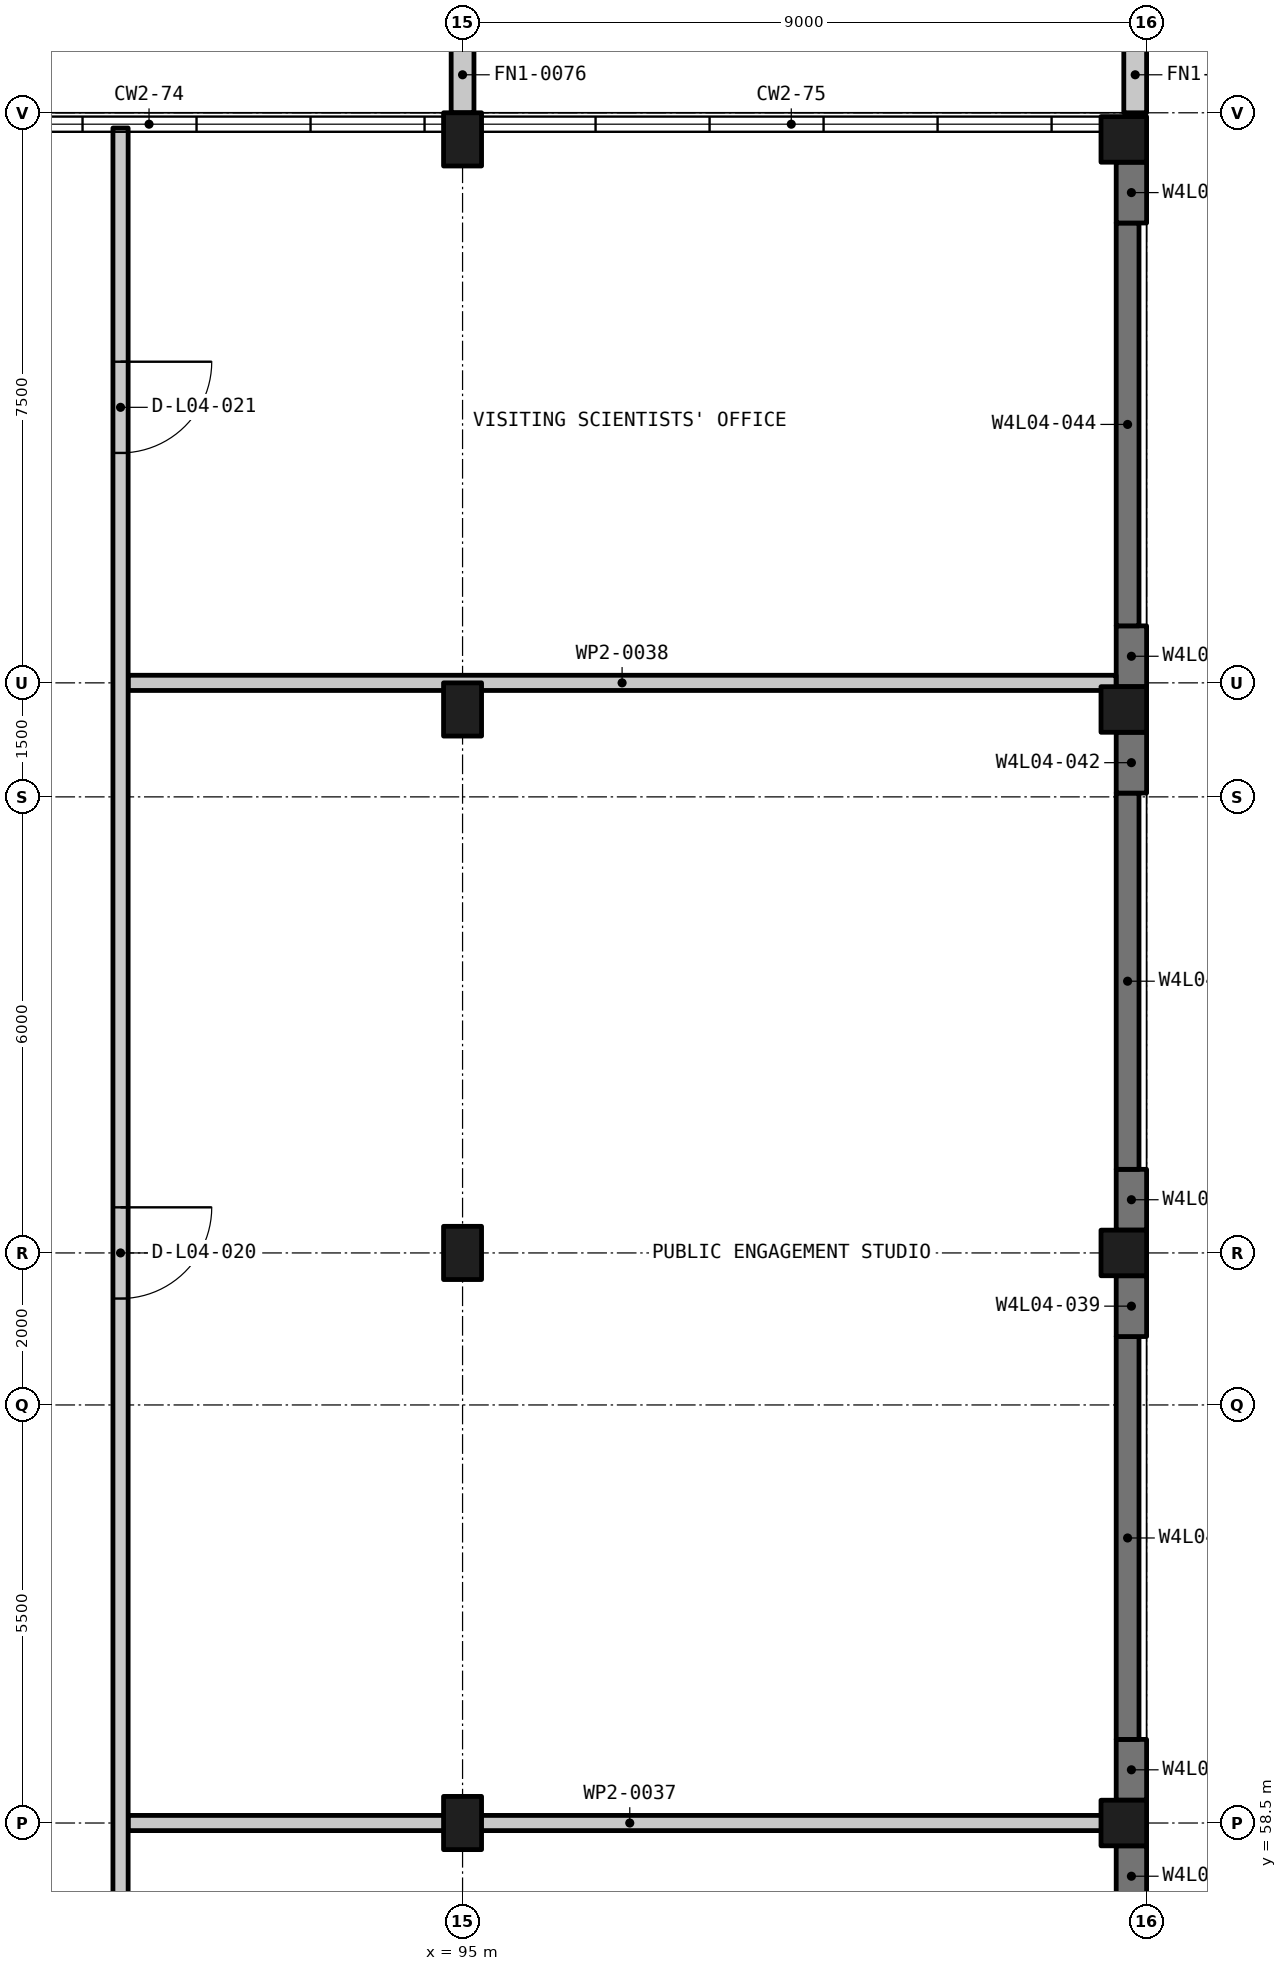
"""IFC4 building model, lengths in metres.
Left out: names, types, materials, properties, quantities, classifications, styles, units other than length and angle.
Written with IfcOpenShell. Run it as: python <this file> out.ifc"""

import sys

from ifc_helpers import new_model, si_unit, direction, frame, frame_2d, origin, origin_2d, place, context, subcontext, project, spatial, rectangle, extrude, element, fill, save


model = new_model("IFC4")
c1 = context("Model", 3, precision=1e-05, world=origin(), true_north=direction((0.0, 1.0)))
c2 = subcontext(c1, "Body", "Model", "MODEL_VIEW")
j1 = project(units=[si_unit("LENGTHUNIT", "METRE"), si_unit("PLANEANGLEUNIT", "RADIAN")], contexts=[c1])
p1 = place(None, origin())
s1 = spatial("IfcSite", under=j1, at=p1, CompositionType="ELEMENT")
p2 = place(p1, origin())
s2 = spatial("IfcBuilding", under=s1, at=p2, CompositionType="ELEMENT")
p3 = place(p2, frame((0.0, 0.0, 20.25)))
s3 = spatial("IfcBuildingStorey", under=s2, at=p3, CompositionType="ELEMENT", Elevation=20.25)
for number, where, z_axis, x_axis in (
    (1, (95.0, 58.5, -0.3), (0.0, 0.0, 1.0), (1.0, 0.0, 0.0)),
    (2, (95.0, 66.0, -0.3), (0.0, 0.0, 1.0), (1.0, 0.0, 0.0)),
    (3, (95.0, 73.15, -0.3), (0.0, 0.0, 1.0), (1.0, 0.0, 0.0)),
    (4, (95.0, 80.65, -0.3), (0.0, 0.0, 1.0), (1.0, 0.0, 0.0)),
):
    element("IfcColumn", number, at=place(p3, frame(where, z_axis=z_axis, x_axis=x_axis)), inside=s3, PredefinedType="COLUMN", context=c2, shape_type="SweptSolid", body=[
        extrude(rectangle(XDim=0.5, YDim=0.7, at=origin_2d()), origin(), (0.0, 0.0, 1.0), 4.5),
    ])
for number, where, z_axis, x_axis in (
    (5, (103.7, 58.5, -0.3), (0.0, 0.0, 1.0), (1.0, 0.0, 0.0)),
    (6, (103.7, 66.0, -0.3), (0.0, 0.0, 1.0), (1.0, 0.0, 0.0)),
    (7, (103.7, 73.15, -0.3), (0.0, 0.0, 1.0), (1.0, 0.0, 0.0)),
    (8, (103.7, 80.65, -0.3), (0.0, 0.0, 1.0), (1.0, 0.0, 0.0)),
):
    element("IfcColumn", number, at=place(p3, frame(where, z_axis=z_axis, x_axis=x_axis)), inside=s3, PredefinedType="COLUMN", context=c2, shape_type="SweptSolid", body=[
        extrude(rectangle(XDim=0.6, YDim=0.6, at=origin_2d()), origin(), (0.0, 0.0, 1.0), 4.5),
    ])
for number, where, z_axis, x_axis in (
    (9, (103.8, 57.4, -0.3), (0.0, 0.0, 1.0), (0.0, 1.0, 0.0)),
    (10, (103.8, 58.8, -0.3), (0.0, 0.0, 1.0), (0.0, 1.0, 0.0)),
):
    element("IfcWall", number, at=place(p3, frame(where, z_axis=z_axis, x_axis=x_axis)), inside=s3, PredefinedType="SOLIDWALL", context=c2, shape_type="SweptSolid", body=[
        extrude(rectangle(XDim=0.8, YDim=0.4, at=frame_2d((0.4, 0.0))), origin(), (0.0, 0.0, 1.0), 4.5),
    ])
p4 = place(p3, frame((103.75, 59.6, -0.3), z_axis=(0.0, 0.0, 1.0), x_axis=(0.0, 1.0, 0.0)))
e11 = element("IfcWall", 11, at=p4, inside=s3, PredefinedType="SOLIDWALL", context=c2, shape_type="SweptSolid", body=[
    extrude(rectangle(XDim=5.3, YDim=0.3, at=frame_2d((2.65, 0.0))), origin(), (0.0, 0.0, 1.0), 4.5),
])
for number, where, z_axis, x_axis in (
    (12, (103.8, 64.9, -0.3), (0.0, 0.0, 1.0), (0.0, 1.0, 0.0)),
    (13, (103.8, 66.3, -0.3), (0.0, 0.0, 1.0), (0.0, 1.0, 0.0)),
):
    element("IfcWall", number, at=place(p3, frame(where, z_axis=z_axis, x_axis=x_axis)), inside=s3, PredefinedType="SOLIDWALL", context=c2, shape_type="SweptSolid", body=[
        extrude(rectangle(XDim=0.8, YDim=0.4, at=frame_2d((0.4, 0.0))), origin(), (0.0, 0.0, 1.0), 4.5),
    ])
p5 = place(p3, frame((103.75, 67.1, -0.3), z_axis=(0.0, 0.0, 1.0), x_axis=(0.0, 1.0, 0.0)))
e14 = element("IfcWall", 14, at=p5, inside=s3, PredefinedType="SOLIDWALL", context=c2, shape_type="SweptSolid", body=[
    extrude(rectangle(XDim=4.95, YDim=0.3, at=frame_2d((2.475, 0.0))), origin(), (0.0, 0.0, 1.0), 4.5),
])
for number, where, z_axis, x_axis in (
    (15, (103.8, 72.05, -0.3), (0.0, 0.0, 1.0), (0.0, 1.0, 0.0)),
    (16, (103.8, 73.45, -0.3), (0.0, 0.0, 1.0), (0.0, 1.0, 0.0)),
):
    element("IfcWall", number, at=place(p3, frame(where, z_axis=z_axis, x_axis=x_axis)), inside=s3, PredefinedType="SOLIDWALL", context=c2, shape_type="SweptSolid", body=[
        extrude(rectangle(XDim=0.8, YDim=0.4, at=frame_2d((0.4, 0.0))), origin(), (0.0, 0.0, 1.0), 4.5),
    ])
p6 = place(p3, frame((103.75, 74.25, -0.3), z_axis=(0.0, 0.0, 1.0), x_axis=(0.0, 1.0, 0.0)))
e17 = element("IfcWall", 17, at=p6, inside=s3, PredefinedType="SOLIDWALL", context=c2, shape_type="SweptSolid", body=[
    extrude(rectangle(XDim=5.3, YDim=0.3, at=frame_2d((2.65, 0.0))), origin(), (0.0, 0.0, 1.0), 4.5),
])
p7 = place(p3, frame((103.8, 79.55, -0.3), z_axis=(0.0, 0.0, 1.0), x_axis=(0.0, 1.0, 0.0)))
e18 = element("IfcWall", 18, at=p7, inside=s3, PredefinedType="SOLIDWALL", context=c2, shape_type="SweptSolid", body=[
    extrude(rectangle(XDim=0.8, YDim=0.4, at=frame_2d((0.4, 0.0))), origin(), (0.0, 0.0, 1.0), 4.5),
])
for number, where, z_axis, x_axis in (
    (19, (95.0, 81.0, 0.0), (0.0, 0.0, 1.0), (0.0, 1.0, 0.0)),
    (20, (103.85, 81.0, 0.0), (0.0, 0.0, 1.0), (0.0, 1.0, 0.0)),
):
    element("IfcWall", number, at=place(p3, frame(where, z_axis=z_axis, x_axis=x_axis)), inside=s3, PredefinedType="SOLIDWALL", context=c2, shape_type="SweptSolid", body=[
        extrude(rectangle(XDim=1.0, YDim=0.3, at=frame_2d((0.5, 0.0))), origin(), (0.0, 0.0, 1.0), 4.5),
    ])
p8 = place(p3, frame((90.6, 58.5, 0.0), z_axis=(0.0, 0.0, 1.0), x_axis=(1.0, 0.0, 0.0)))
e21 = element("IfcWall", 21, at=p8, inside=s3, PredefinedType="PARTITIONING", context=c2, shape_type="SweptSolid", body=[
    extrude(rectangle(XDim=13.2, YDim=0.2, at=frame_2d((6.6, 0.0))), origin(), (0.0, 0.0, 1.0), 3.3),
])
p9 = place(p3, frame((90.6, 73.5, 0.0), z_axis=(0.0, 0.0, 1.0), x_axis=(1.0, 0.0, 0.0)))
e22 = element("IfcWall", 22, at=p9, inside=s3, PredefinedType="PARTITIONING", context=c2, shape_type="SweptSolid", body=[
    extrude(rectangle(XDim=12.998, YDim=0.2, at=frame_2d((6.499, 0.0))), origin(), (0.0, 0.0, 1.0), 3.4),
])
p10 = place(p3, frame((90.5, 80.8, 0.0), z_axis=(0.0, 0.0, 1.0), x_axis=(0.0, -1.0, 0.0)))
e23 = element("IfcWall", 23, at=p10, inside=s3, PredefinedType="PARTITIONING", context=c2, shape_type="SweptSolid", body=[
    extrude(rectangle(XDim=52.1, YDim=0.2, at=frame_2d((26.05, 0.0))), origin(), (0.0, 0.0, 1.0), 3.3),
])
p11 = place(p10, frame((47.85, 0.0, 0.0)))
e24 = element("IfcOpeningElement", 24, at=p11, cuts=e23, PredefinedType="OPENING", context=c2, shape_type="SweptSolid", body=[
    extrude(rectangle(XDim=1.2, YDim=2.1, at=frame_2d((0.6, 1.05))), frame((0.0, 0.11, 0.0), z_axis=(0.0, -1.0, 0.0), x_axis=(1.0, 0.0, 0.0)), (0.0, 0.0, 1.0), 0.22),
])
p12 = place(p10, frame((38.949, 0.0, 0.0)))
e25 = element("IfcOpeningElement", 25, at=p12, cuts=e23, PredefinedType="OPENING", context=c2, shape_type="SweptSolid", body=[
    extrude(rectangle(XDim=1.2, YDim=2.1, at=frame_2d((0.6, 1.05))), frame((0.0, 0.11, 0.0), z_axis=(0.0, -1.0, 0.0), x_axis=(1.0, 0.0, 0.0)), (0.0, 0.0, 1.0), 0.22),
])
p13 = place(p10, frame((24.201, 0.0, 0.0)))
e26 = element("IfcOpeningElement", 26, at=p13, cuts=e23, PredefinedType="OPENING", context=c2, shape_type="SweptSolid", body=[
    extrude(rectangle(XDim=1.2, YDim=2.1, at=frame_2d((0.6, 1.05))), frame((0.0, 0.11, 0.0), z_axis=(0.0, -1.0, 0.0), x_axis=(1.0, 0.0, 0.0)), (0.0, 0.0, 1.0), 0.22),
])
p14 = place(p10, frame((14.2, 0.0, 0.0)))
e27 = element("IfcOpeningElement", 27, at=p14, cuts=e23, PredefinedType="OPENING", context=c2, shape_type="SweptSolid", body=[
    extrude(rectangle(XDim=1.2, YDim=2.1, at=frame_2d((0.6, 1.05))), frame((0.0, 0.11, 0.0), z_axis=(0.0, -1.0, 0.0), x_axis=(1.0, 0.0, 0.0)), (0.0, 0.0, 1.0), 0.22),
])
p15 = place(p10, frame((3.075, 0.0, 0.0)))
e28 = element("IfcOpeningElement", 28, at=p15, cuts=e23, PredefinedType="OPENING", context=c2, shape_type="SweptSolid", body=[
    extrude(rectangle(XDim=1.2, YDim=2.1, at=frame_2d((0.6, 1.05))), frame((0.0, 0.11, 0.0), z_axis=(0.0, -1.0, 0.0), x_axis=(1.0, 0.0, 0.0)), (0.0, 0.0, 1.0), 0.22),
])
p16 = place(p14, origin())
e29 = element("IfcDoor", 29, at=p16, inside=s3, OperationType="SINGLE_SWING_RIGHT", PredefinedType="DOOR", context=c2, shape_type="SweptSolid", body=[
    extrude(rectangle(XDim=1.2, YDim=2.1, at=frame_2d((0.6, 1.05))), frame((0.0, 0.025, 0.0), z_axis=(0.0, -1.0, 0.0), x_axis=(1.0, 0.0, 0.0)), (0.0, 0.0, 1.0), 0.05),
])
fill(e27, e29)
p17 = place(p15, origin())
e30 = element("IfcDoor", 30, at=p17, inside=s3, OperationType="SINGLE_SWING_RIGHT", PredefinedType="DOOR", context=c2, shape_type="SweptSolid", body=[
    extrude(rectangle(XDim=1.2, YDim=2.1, at=frame_2d((0.6, 1.05))), frame((0.0, 0.025, 0.0), z_axis=(0.0, -1.0, 0.0), x_axis=(1.0, 0.0, 0.0)), (0.0, 0.0, 1.0), 0.05),
])
fill(e28, e30)
save(model, sys.argv[1])
